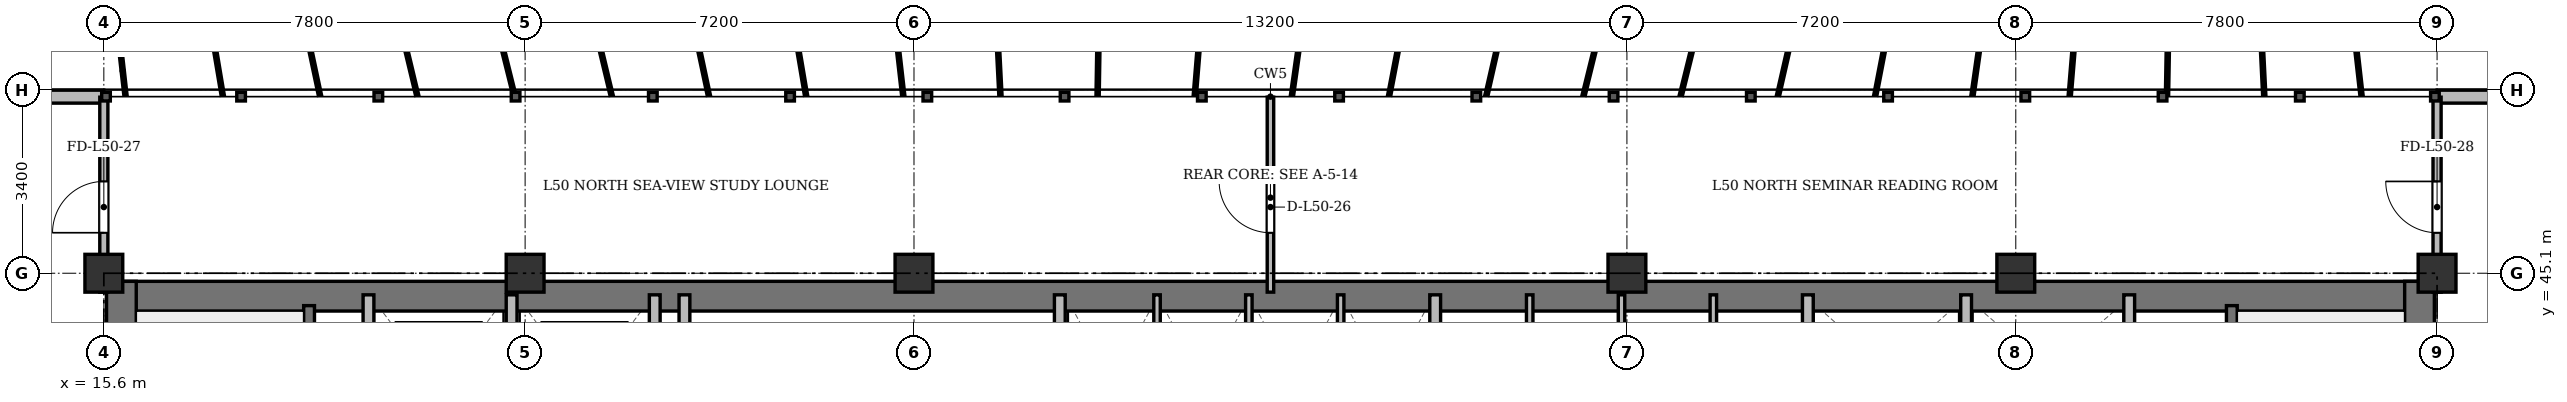
"""IFC4 building model, lengths in metres.
Left out: names, types, materials, properties, quantities, classifications, styles, units other than length and angle.
Written with IfcOpenShell. Run it as: python <this file> out.ifc"""

import sys

from ifc_helpers import new_model, si_unit, direction, frame, frame_2d, origin, origin_2d, place, context, subcontext, project, spatial, rectangle, extrude, source, transform, mapped, element, fill, save


model = new_model("IFC4")
c1 = context("Model", 3, precision=1e-05, world=origin(), true_north=direction((0.0, 1.0)))
c2 = subcontext(c1, "Body", "Model", "MODEL_VIEW")
j1 = project(units=[si_unit("LENGTHUNIT", "METRE"), si_unit("PLANEANGLEUNIT", "RADIAN")], contexts=[c1])
p1 = place(None, origin())
s1 = spatial("IfcSite", under=j1, at=p1, CompositionType="ELEMENT")
p2 = place(p1, origin())
s2 = spatial("IfcBuilding", under=s1, at=p2, CompositionType="ELEMENT")
p3 = place(p2, frame((0.0, 0.0, 194.1)))
s3 = spatial("IfcBuildingStorey", under=s2, at=p3, CompositionType="ELEMENT", Elevation=194.1)
m1 = source(origin(), c2, "Body", "SweptSolid", [
    extrude(rectangle(XDim=0.7, YDim=0.7, at=origin_2d()), origin(), (0.0, 0.0, 1.0), 3.6),
])
for number, where, z_axis, x_axis in (
    (1, (15.6, 45.1, 0.0), (0.0, 0.0, 1.0), (1.0, 0.0, 0.0)),
    (2, (23.4, 45.1, 0.0), (0.0, 0.0, 1.0), (1.0, 0.0, 0.0)),
    (3, (30.6, 45.1, 0.0), (0.0, 0.0, 1.0), (1.0, 0.0, 0.0)),
    (4, (43.8, 45.1, 0.0), (0.0, 0.0, 1.0), (1.0, 0.0, 0.0)),
    (5, (51.0, 45.1, 0.0), (0.0, 0.0, 1.0), (1.0, 0.0, 0.0)),
    (6, (58.8, 45.1, 0.0), (0.0, 0.0, 1.0), (1.0, 0.0, 0.0)),
):
    element("IfcColumn", number, at=place(p3, frame(where, z_axis=z_axis, x_axis=x_axis)), inside=s3, PredefinedType="COLUMN", context=c2, shape_type="MappedRepresentation", body=[
        mapped(m1, transform((0.0, 0.0, 0.0), x_axis=(1.0, 0.0, 0.0), y_axis=(0.0, 1.0, 0.0), z_axis=(0.0, 0.0, 1.0), scale=1.0)),
    ])
p4 = place(p3, frame((11.1, 48.37, 0.0), z_axis=(0.0, 0.0, 1.0), x_axis=(1.0, 0.0, 0.0)))
e7 = element("IfcWall", 7, at=p4, inside=s3, PredefinedType="SOLIDWALL", context=c2, shape_type="SweptSolid", body=[
    extrude(rectangle(XDim=4.5, YDim=0.24, at=frame_2d((2.25, 0.0))), origin(), (0.0, 0.0, 1.0), 3.36),
])
p5 = place(p4, frame((1.983, 0.0, 0.9)))
e8 = element("IfcOpeningElement", 8, at=p5, cuts=e7, PredefinedType="OPENING", context=c2, shape_type="SweptSolid", body=[
    extrude(rectangle(XDim=1.2, YDim=1.65, at=frame_2d((0.6, 0.825))), frame((0.0, 0.13, 0.0), z_axis=(0.0, -1.0, 0.0), x_axis=(1.0, 0.0, 0.0)), (0.0, 0.0, 1.0), 0.26),
])
p6 = place(p3, frame((58.8, 48.37, 0.0), z_axis=(0.0, 0.0, 1.0), x_axis=(1.0, 0.0, 0.0)))
e9 = element("IfcWall", 9, at=p6, inside=s3, PredefinedType="SOLIDWALL", context=c2, shape_type="SweptSolid", body=[
    extrude(rectangle(XDim=4.5, YDim=0.24, at=frame_2d((2.25, 0.0))), origin(), (0.0, 0.0, 1.0), 3.36),
])
p7 = place(p6, frame((1.65, 0.0, 0.9)))
e10 = element("IfcOpeningElement", 10, at=p7, cuts=e9, PredefinedType="OPENING", context=c2, shape_type="SweptSolid", body=[
    extrude(rectangle(XDim=1.2, YDim=1.65, at=frame_2d((0.6, 0.825))), frame((0.0, 0.13, 0.0), z_axis=(0.0, -1.0, 0.0), x_axis=(1.0, 0.0, 0.0)), (0.0, 0.0, 1.0), 0.26),
])
p8 = place(p3, frame((15.65, 44.675, 0.0), z_axis=(0.0, 0.0, 1.0), x_axis=(1.0, 0.0, 0.0)))
e11 = element("IfcWall", 11, at=p8, inside=s3, PredefinedType="SHEAR", context=c2, shape_type="SweptSolid", body=[
    extrude(rectangle(XDim=43.1, YDim=0.55, at=frame_2d((21.55, 0.0))), origin(), (0.0, 0.0, 1.0), 3.36),
])
for number, where, z_axis, x_axis in (
    (12, (15.925, 33.4, 0.0), (0.0, 0.0, 1.0), (0.0, 1.0, 0.0)),
    (13, (58.475, 33.4, 0.0), (0.0, 0.0, 1.0), (0.0, 1.0, 0.0)),
):
    element("IfcWall", number, at=place(p3, frame(where, z_axis=z_axis, x_axis=x_axis)), inside=s3, PredefinedType="SHEAR", context=c2, shape_type="SweptSolid", body=[
        extrude(rectangle(XDim=11.55, YDim=0.55, at=frame_2d((5.775, 0.0))), origin(), (0.0, 0.0, 1.0), 3.36),
    ])
p9 = place(p3, frame((19.4, 33.4, 0.0), z_axis=(0.0, 0.0, 1.0), x_axis=(0.0, 1.0, 0.0)))
e14 = element("IfcWall", 14, at=p9, inside=s3, PredefinedType="SHEAR", context=c2, shape_type="SweptSolid", body=[
    extrude(rectangle(XDim=11.1, YDim=0.2, at=frame_2d((5.55, 0.0))), origin(), (0.0, 0.0, 1.0), 3.36),
])
p10 = place(p9, frame((0.85, 0.0, 0.0)))
e15 = element("IfcOpeningElement", 15, at=p10, cuts=e14, PredefinedType="OPENING", context=c2, shape_type="SweptSolid", body=[
    extrude(rectangle(XDim=1.1, YDim=2.15, at=frame_2d((0.55, 1.075))), frame((0.0, 0.11, 0.0), z_axis=(0.0, -1.0, 0.0), x_axis=(1.0, 0.0, 0.0)), (0.0, 0.0, 1.0), 0.22),
])
p11 = place(p3, frame((55.0, 33.4, 0.0), z_axis=(0.0, 0.0, 1.0), x_axis=(0.0, 1.0, 0.0)))
e16 = element("IfcWall", 16, at=p11, inside=s3, PredefinedType="SHEAR", context=c2, shape_type="SweptSolid", body=[
    extrude(rectangle(XDim=11.1, YDim=0.2, at=frame_2d((5.55, 0.0))), origin(), (0.0, 0.0, 1.0), 3.36),
])
p12 = place(p11, frame((0.85, 0.0, 0.0)))
e17 = element("IfcOpeningElement", 17, at=p12, cuts=e16, PredefinedType="OPENING", context=c2, shape_type="SweptSolid", body=[
    extrude(rectangle(XDim=1.1, YDim=2.15, at=frame_2d((0.55, 1.075))), frame((0.0, 0.11, 0.0), z_axis=(0.0, -1.0, 0.0), x_axis=(1.0, 0.0, 0.0)), (0.0, 0.0, 1.0), 0.22),
])
for number, where, z_axis, x_axis in (
    (18, (20.5, 41.3, 0.0), (0.0, 0.0, 1.0), (0.0, 1.0, 0.0)),
    (19, (23.15, 41.3, 0.0), (0.0, 0.0, 1.0), (0.0, 1.0, 0.0)),
    (20, (25.8, 41.3, 0.0), (0.0, 0.0, 1.0), (0.0, 1.0, 0.0)),
):
    element("IfcWall", number, at=place(p3, frame(where, z_axis=z_axis, x_axis=x_axis)), inside=s3, PredefinedType="SOLIDWALL", context=c2, shape_type="SweptSolid", body=[
        extrude(rectangle(XDim=3.4, YDim=0.2, at=frame_2d((1.7, 0.0))), origin(), (0.0, 0.0, 1.0), 3.36),
    ])
for number, where, z_axis, x_axis in (
    (21, (26.35, 33.4, 0.0), (0.0, 0.0, 1.0), (0.0, 1.0, 0.0)),
    (22, (33.3, 33.4, 0.0), (0.0, 0.0, 1.0), (0.0, 1.0, 0.0)),
):
    element("IfcWall", number, at=place(p3, frame(where, z_axis=z_axis, x_axis=x_axis)), inside=s3, PredefinedType="SOLIDWALL", context=c2, shape_type="SweptSolid", body=[
        extrude(rectangle(XDim=11.3, YDim=0.2, at=frame_2d((5.65, 0.0))), origin(), (0.0, 0.0, 1.0), 2.91),
    ])
for number, where, z_axis, x_axis in (
    (23, (35.1, 41.5, 0.0), (0.0, 0.0, 1.0), (0.0, 1.0, 0.0)),
    (24, (36.8, 41.5, 0.0), (0.0, 0.0, 1.0), (0.0, 1.0, 0.0)),
    (25, (38.5, 41.5, 0.0), (0.0, 0.0, 1.0), (0.0, 1.0, 0.0)),
):
    element("IfcWall", number, at=place(p3, frame(where, z_axis=z_axis, x_axis=x_axis)), inside=s3, PredefinedType="PARTITIONING", context=c2, shape_type="SweptSolid", body=[
        extrude(rectangle(XDim=3.2, YDim=0.12, at=frame_2d((1.6, 0.0))), origin(), (0.0, 0.0, 1.0), 3.36),
    ])
p13 = place(p3, frame((40.25, 41.5, 0.0), z_axis=(0.0, 0.0, 1.0), x_axis=(0.0, 1.0, 0.0)))
e26 = element("IfcWall", 26, at=p13, inside=s3, PredefinedType="SOLIDWALL", context=c2, shape_type="SweptSolid", body=[
    extrude(rectangle(XDim=3.2, YDim=0.2, at=frame_2d((1.6, 0.0))), origin(), (0.0, 0.0, 1.0), 3.36),
])
p14 = place(p3, frame((42.0, 41.5, 0.0), z_axis=(0.0, 0.0, 1.0), x_axis=(0.0, 1.0, 0.0)))
e27 = element("IfcWall", 27, at=p14, inside=s3, PredefinedType="PARTITIONING", context=c2, shape_type="SweptSolid", body=[
    extrude(rectangle(XDim=3.2, YDim=0.12, at=frame_2d((1.6, 0.0))), origin(), (0.0, 0.0, 1.0), 3.36),
])
p15 = place(p3, frame((43.7, 41.5, 0.0), z_axis=(0.0, 0.0, 1.0), x_axis=(0.0, 1.0, 0.0)))
e28 = element("IfcWall", 28, at=p15, inside=s3, PredefinedType="PARTITIONING", context=c2, shape_type="SweptSolid", body=[
    extrude(rectangle(XDim=3.2, YDim=0.12, at=frame_2d((1.6, 0.0))), origin(), (0.0, 0.0, 1.0), 2.86),
])
p16 = place(p3, frame((45.4, 41.5, 0.0), z_axis=(0.0, 0.0, 1.0), x_axis=(0.0, 1.0, 0.0)))
e29 = element("IfcWall", 29, at=p16, inside=s3, PredefinedType="PARTITIONING", context=c2, shape_type="SweptSolid", body=[
    extrude(rectangle(XDim=3.2, YDim=0.12, at=frame_2d((1.6, 0.0))), origin(), (0.0, 0.0, 1.0), 3.36),
])
p17 = place(p3, frame((47.15, 33.4, 0.0), z_axis=(0.0, 0.0, 1.0), x_axis=(0.0, 1.0, 0.0)))
e30 = element("IfcWall", 30, at=p17, inside=s3, PredefinedType="SOLIDWALL", context=c2, shape_type="SweptSolid", body=[
    extrude(rectangle(XDim=11.3, YDim=0.2, at=frame_2d((5.65, 0.0))), origin(), (0.0, 0.0, 1.0), 2.91),
])
for number, where, z_axis, x_axis in (
    (31, (50.08, 42.05, 0.0), (0.0, 0.0, 1.0), (0.0, 1.0, 0.0)),
    (32, (53.1, 42.05, 0.0), (0.0, 0.0, 1.0), (0.0, 1.0, 0.0)),
):
    element("IfcWall", number, at=place(p3, frame(where, z_axis=z_axis, x_axis=x_axis)), inside=s3, PredefinedType="SOLIDWALL", context=c2, shape_type="SweptSolid", body=[
        extrude(rectangle(XDim=2.65, YDim=0.2, at=frame_2d((1.325, 0.0))), origin(), (0.0, 0.0, 1.0), 3.36),
    ])
p18 = place(p3, frame((37.2, 44.75, 0.0), z_axis=(0.0, 0.0, 1.0), x_axis=(0.0, 1.0, 0.0)))
e33 = element("IfcWall", 33, at=p18, inside=s3, PredefinedType="PARTITIONING", context=c2, shape_type="SweptSolid", body=[
    extrude(rectangle(XDim=3.61, YDim=0.12, at=frame_2d((1.805, 0.0))), origin(), (0.0, 0.0, 1.0), 2.91),
])
p19 = place(p18, frame((1.1, 0.0, 0.0)))
e34 = element("IfcOpeningElement", 34, at=p19, cuts=e33, PredefinedType="OPENING", context=c2, shape_type="SweptSolid", body=[
    extrude(rectangle(XDim=0.95, YDim=2.15, at=frame_2d((0.475, 1.075))), frame((0.0, 0.07, 0.0), z_axis=(0.0, -1.0, 0.0), x_axis=(1.0, 0.0, 0.0)), (0.0, 0.0, 1.0), 0.14),
])
p20 = place(p3, frame((15.6, 44.75, 0.0), z_axis=(0.0, 0.0, 1.0), x_axis=(0.0, 1.0, 0.0)))
e35 = element("IfcWall", 35, at=p20, inside=s3, PredefinedType="PARTITIONING", context=c2, shape_type="SweptSolid", body=[
    extrude(rectangle(XDim=3.61, YDim=0.15, at=frame_2d((1.805, 0.0))), origin(), (0.0, 0.0, 1.0), 2.86),
])
p21 = place(p20, frame((1.1, 0.0, 0.0)))
e36 = element("IfcOpeningElement", 36, at=p21, cuts=e35, PredefinedType="OPENING", context=c2, shape_type="SweptSolid", body=[
    extrude(rectangle(XDim=0.95, YDim=2.15, at=frame_2d((0.475, 1.075))), frame((0.0, 0.085, 0.0), z_axis=(0.0, -1.0, 0.0), x_axis=(1.0, 0.0, 0.0)), (0.0, 0.0, 1.0), 0.17),
])
p22 = place(p3, frame((58.8, 44.75, 0.0), z_axis=(0.0, 0.0, 1.0), x_axis=(0.0, 1.0, 0.0)))
e37 = element("IfcWall", 37, at=p22, inside=s3, PredefinedType="PARTITIONING", context=c2, shape_type="SweptSolid", body=[
    extrude(rectangle(XDim=3.61, YDim=0.15, at=frame_2d((1.805, 0.0))), origin(), (0.0, 0.0, 1.0), 2.86),
])
p23 = place(p22, frame((1.1, 0.0, 0.0)))
e38 = element("IfcOpeningElement", 38, at=p23, cuts=e37, PredefinedType="OPENING", context=c2, shape_type="SweptSolid", body=[
    extrude(rectangle(XDim=0.95, YDim=2.15, at=frame_2d((0.475, 1.075))), frame((0.0, 0.085, 0.0), z_axis=(0.0, -1.0, 0.0), x_axis=(1.0, 0.0, 0.0)), (0.0, 0.0, 1.0), 0.17),
])
m2 = source(origin(), c2, "Body", "SweptSolid", [
    extrude(rectangle(XDim=0.95, YDim=2.15, at=frame_2d((0.475, 1.075))), frame((0.0, 0.025, 0.0), z_axis=(0.0, -1.0, 0.0), x_axis=(1.0, 0.0, 0.0)), (0.0, 0.0, 1.0), 0.05),
])
p24 = place(p19, origin())
e39 = element("IfcDoor", 39, at=p24, inside=s3, OperationType="SINGLE_SWING_RIGHT", PredefinedType="DOOR", context=c2, shape_type="MappedRepresentation", body=[
    mapped(m2, transform((0.0, 0.0, 0.0), x_axis=(1.0, 0.0, 0.0), y_axis=(0.0, 1.0, 0.0), z_axis=(0.0, 0.0, 1.0), scale=1.0)),
])
fill(e34, e39)
p25 = place(p21, origin())
e40 = element("IfcDoor", 40, at=p25, inside=s3, OperationType="SINGLE_SWING_LEFT", PredefinedType="DOOR", context=c2, shape_type="MappedRepresentation", body=[
    mapped(m2, transform((0.0, 0.0, 0.0), x_axis=(1.0, 0.0, 0.0), y_axis=(0.0, 1.0, 0.0), z_axis=(0.0, 0.0, 1.0), scale=1.0)),
])
fill(e36, e40)
p26 = place(p23, origin())
e41 = element("IfcDoor", 41, at=p26, inside=s3, OperationType="SINGLE_SWING_RIGHT", PredefinedType="DOOR", context=c2, shape_type="MappedRepresentation", body=[
    mapped(m2, transform((0.0, 0.0, 0.0), x_axis=(1.0, 0.0, 0.0), y_axis=(0.0, 1.0, 0.0), z_axis=(0.0, 0.0, 1.0), scale=1.0)),
])
fill(e38, e41)
save(model, sys.argv[1])
